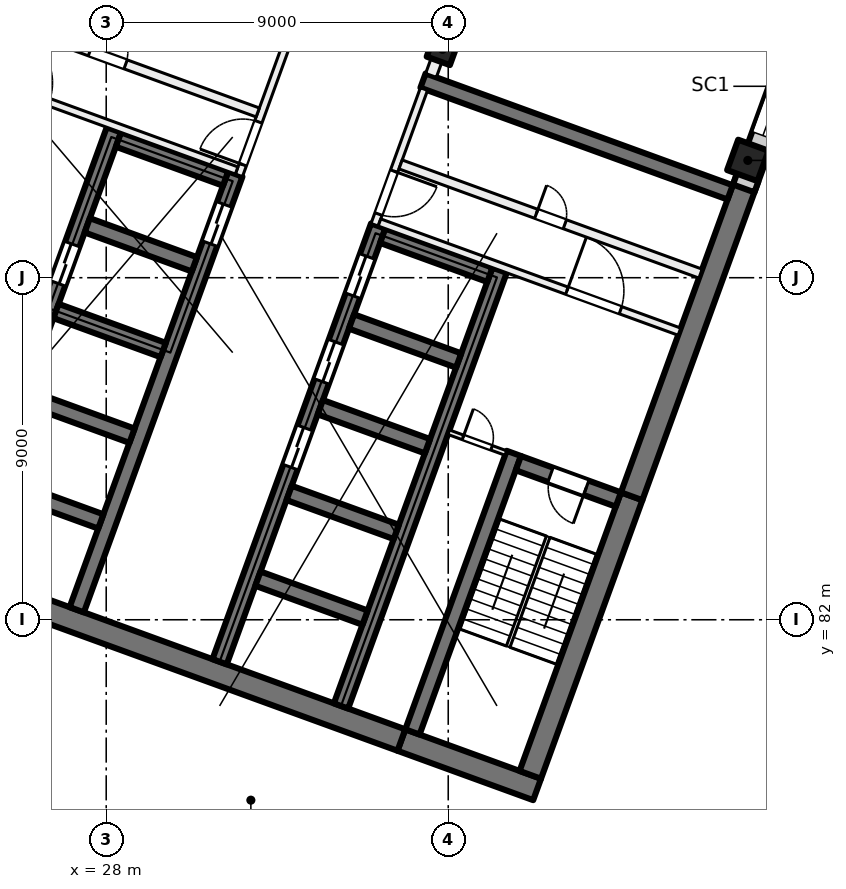
"""IFC4 building model, lengths in metres.
Left out: names, types, materials, properties, quantities, classifications, styles, units other than length and angle.
Written with IfcOpenShell. Run it as: python <this file> out.ifc"""

import sys

from ifc_helpers import new_model, si_unit, direction, frame, frame_2d, origin, origin_2d, place, context, subcontext, project, spatial, rectangle, extrude, element, fill, save


model = new_model("IFC4")
c1 = context("Model", 3, precision=1e-05, world=origin(), true_north=direction((0.0, 1.0)))
c2 = subcontext(c1, "Body", "Model", "MODEL_VIEW")
j1 = project(units=[si_unit("LENGTHUNIT", "METRE"), si_unit("PLANEANGLEUNIT", "RADIAN")], contexts=[c1])
p1 = place(None, origin())
s1 = spatial("IfcSite", under=j1, at=p1, CompositionType="ELEMENT")
p2 = place(p1, origin())
s2 = spatial("IfcBuilding", under=s1, at=p2, CompositionType="ELEMENT")
p3 = place(p2, frame((0.0, 0.0, 125.0)))
s3 = spatial("IfcBuildingStorey", under=s2, at=p3, CompositionType="ELEMENT", Elevation=125.0)
p4 = place(p3, frame((36.849, 97.011, 0.0), z_axis=(0.0, 0.0, 1.0), x_axis=(-0.342020143326, -0.939692620786, 0.0)))
e1 = element("IfcColumn", 1, at=p4, inside=s3, PredefinedType="COLUMN", context=c2, shape_type="SweptSolid", body=[
    extrude(rectangle(XDim=0.65, YDim=0.65, at=origin_2d()), origin(), (0.0, 0.0, 1.0), 4.0),
])
p5 = place(p3, frame((44.884, 94.087, 0.0), z_axis=(0.0, 0.0, 1.0), x_axis=(-0.342020143326, -0.939692620786, 0.0)))
e2 = element("IfcColumn", 2, at=p5, inside=s3, PredefinedType="COLUMN", context=c2, shape_type="SweptSolid", body=[
    extrude(rectangle(XDim=0.85, YDim=0.85, at=origin_2d()), origin(), (0.0, 0.0, 1.0), 4.0),
])
p6 = place(p3, frame((39.338, 77.535, 0.0), z_axis=(0.0, 0.0, 1.0), x_axis=(-0.939701471648, 0.341995824804, 0.0)))
e3 = element("IfcWall", 3, at=p6, inside=s3, PredefinedType="SHEAR", context=c2, shape_type="SweptSolid", body=[
    extrude(rectangle(XDim=3.8, YDim=0.6, at=frame_2d((1.9, 0.0))), origin(), (0.0, 0.0, 1.0), 4.0),
])
p7 = place(p3, frame((35.767, 78.835, 0.0), z_axis=(0.0, 0.0, 1.0), x_axis=(-0.939692894512, 0.342019391267, 0.0)))
e4 = element("IfcWall", 4, at=p7, inside=s3, PredefinedType="SHEAR", context=c2, shape_type="SweptSolid", body=[
    extrude(rectangle(XDim=14.4, YDim=0.6, at=frame_2d((7.2, 0.0))), origin(), (0.0, 0.0, 1.0), 4.0),
])
p8 = place(p3, frame((39.159, 77.92, 0.0), z_axis=(0.0, 0.0, 1.0), x_axis=(0.342016982193, 0.939693771338, 0.0)))
e5 = element("IfcWall", 5, at=p8, inside=s3, PredefinedType="SHEAR", context=c2, shape_type="SweptSolid", body=[
    extrude(rectangle(XDim=7.8, YDim=0.6, at=frame_2d((3.9, 0.0))), origin(), (0.0, 0.0, 1.0), 4.0),
])
p9 = place(p3, frame((41.827, 85.249, 0.0), z_axis=(0.0, 0.0, 1.0), x_axis=(0.342017595281, 0.939693548195, 0.0)))
e6 = element("IfcWall", 6, at=p9, inside=s3, PredefinedType="SHEAR", context=c2, shape_type="SweptSolid", body=[
    extrude(rectangle(XDim=8.925, YDim=0.6, at=frame_2d((4.462, 0.0))), origin(), (0.0, 0.0, 1.0), 4.0),
])
p10 = place(p3, frame((36.058, 79.048, 0.0), z_axis=(0.0, 0.0, 1.0), x_axis=(0.342016982193, 0.939693771338, 0.0)))
e7 = element("IfcWall", 7, at=p10, inside=s3, PredefinedType="SHEAR", context=c2, shape_type="SweptSolid", body=[
    extrude(rectangle(XDim=7.8, YDim=0.4, at=frame_2d((3.9, 0.0))), origin(), (0.0, 0.0, 1.0), 4.0),
])
p11 = place(p3, frame((41.476, 85.164, 0.0), z_axis=(0.0, 0.0, 1.0), x_axis=(-0.939678810556, 0.342058084236, 0.0)))
e8 = element("IfcWall", 8, at=p11, inside=s3, PredefinedType="SHEAR", context=c2, shape_type="SweptSolid", body=[
    extrude(rectangle(XDim=2.8, YDim=0.4, at=frame_2d((1.4, 0.0))), origin(), (0.0, 0.0, 1.0), 4.0),
])
p12 = place(p11, frame((0.9, 0.0, 0.0)))
e9 = element("IfcOpeningElement", 9, at=p12, cuts=e8, PredefinedType="OPENING", context=c2, shape_type="SweptSolid", body=[
    extrude(rectangle(XDim=1.0, YDim=2.1, at=frame_2d((0.5, 1.05))), frame((0.0, 0.21, 0.0), z_axis=(0.0, -1.0, 0.0), x_axis=(1.0, 0.0, 0.0)), (0.0, 0.0, 1.0), 0.42),
])
p13 = place(p3, frame((30.984, 80.895, 0.0), z_axis=(0.0, 0.0, 1.0), x_axis=(0.342021021735, 0.939692301071, 0.0)))
e10 = element("IfcWall", 10, at=p13, inside=s3, PredefinedType="SHEAR", context=c2, shape_type="SweptSolid", body=[
    extrude(rectangle(XDim=12.2, YDim=0.4, at=frame_2d((6.1, 0.0))), origin(), (0.0, 0.0, 1.0), 4.0),
])
p14 = place(p13, frame((5.45, 0.0, 0.0)))
e11 = element("IfcOpeningElement", 11, at=p14, cuts=e10, PredefinedType="OPENING", context=c2, shape_type="SweptSolid", body=[
    extrude(rectangle(XDim=1.1, YDim=2.1, at=frame_2d((0.55, 1.05))), frame((0.0, 0.21, 0.0), z_axis=(0.0, -1.0, 0.0), x_axis=(1.0, 0.0, 0.0)), (0.0, 0.0, 1.0), 0.42),
])
p15 = place(p13, frame((7.85, 0.0, 0.0)))
e12 = element("IfcOpeningElement", 12, at=p15, cuts=e10, PredefinedType="OPENING", context=c2, shape_type="SweptSolid", body=[
    extrude(rectangle(XDim=1.1, YDim=2.1, at=frame_2d((0.55, 1.05))), frame((0.0, 0.21, 0.0), z_axis=(0.0, -1.0, 0.0), x_axis=(1.0, 0.0, 0.0)), (0.0, 0.0, 1.0), 0.42),
])
p16 = place(p13, frame((10.25, 0.0, 0.0)))
e13 = element("IfcOpeningElement", 13, at=p16, cuts=e10, PredefinedType="OPENING", context=c2, shape_type="SweptSolid", body=[
    extrude(rectangle(XDim=1.1, YDim=2.1, at=frame_2d((0.55, 1.05))), frame((0.0, 0.21, 0.0), z_axis=(0.0, -1.0, 0.0), x_axis=(1.0, 0.0, 0.0)), (0.0, 0.0, 1.0), 0.42),
])
p17 = place(p3, frame((34.178, 79.732, 0.0), z_axis=(0.0, 0.0, 1.0), x_axis=(0.342014590177, 0.939694641948, 0.0)))
e14 = element("IfcWall", 14, at=p17, inside=s3, PredefinedType="SHEAR", context=c2, shape_type="SweptSolid", body=[
    extrude(rectangle(XDim=12.2, YDim=0.4, at=frame_2d((6.1, 0.0))), origin(), (0.0, 0.0, 1.0), 4.0),
])
for number, where, z_axis, x_axis in (
    (15, (34.812, 82.056, 0.0), (0.0, 0.0, 1.0), (-0.94, 0.342, 0.0)),
    (16, (35.632, 84.311, 0.0), (0.0, 0.0, 1.0), (-0.94, 0.342, 0.0)),
    (17, (36.453, 86.566, 0.0), (0.0, 0.0, 1.0), (-0.94, 0.342, 0.0)),
    (18, (37.274, 88.822, 0.0), (0.0, 0.0, 1.0), (-0.94, 0.342, 0.0)),
):
    element("IfcWall", number, at=place(p3, frame(where, z_axis=z_axis, x_axis=x_axis)), inside=s3, PredefinedType="SHEAR", context=c2, shape_type="SweptSolid", body=[
        extrude(rectangle(XDim=3.0, YDim=0.4, at=frame_2d((1.5, 0.0))), origin(), (0.0, 0.0, 1.0), 4.0),
    ])
p18 = place(p3, frame((38.095, 91.077, 0.0), z_axis=(0.0, 0.0, 1.0), x_axis=(-0.939676934218, 0.342063238742, 0.0)))
e19 = element("IfcWall", 19, at=p18, inside=s3, PredefinedType="SHEAR", context=c2, shape_type="SweptSolid", body=[
    extrude(rectangle(XDim=3.0, YDim=0.4, at=frame_2d((1.5, 0.0))), origin(), (0.0, 0.0, 1.0), 4.0),
])
p19 = place(p3, frame((27.225, 82.263, 0.0), z_axis=(0.0, 0.0, 1.0), x_axis=(0.342014590177, 0.939694641948, 0.0)))
e20 = element("IfcWall", 20, at=p19, inside=s3, PredefinedType="SHEAR", context=c2, shape_type="SweptSolid", body=[
    extrude(rectangle(XDim=12.2, YDim=0.4, at=frame_2d((6.1, 0.0))), origin(), (0.0, 0.0, 1.0), 4.0),
])
p20 = place(p19, frame((10.25, 0.0, 0.0)))
e21 = element("IfcOpeningElement", 21, at=p20, cuts=e20, PredefinedType="OPENING", context=c2, shape_type="SweptSolid", body=[
    extrude(rectangle(XDim=1.1, YDim=2.1, at=frame_2d((0.55, 1.05))), frame((0.0, 0.21, 0.0), z_axis=(0.0, -1.0, 0.0), x_axis=(1.0, 0.0, 0.0)), (0.0, 0.0, 1.0), 0.42),
])
p21 = place(p3, frame((24.03, 83.426, 0.0), z_axis=(0.0, 0.0, 1.0), x_axis=(0.342014590177, 0.939694641948, 0.0)))
e22 = element("IfcWall", 22, at=p21, inside=s3, PredefinedType="SHEAR", context=c2, shape_type="SweptSolid", body=[
    extrude(rectangle(XDim=12.2, YDim=0.4, at=frame_2d((6.1, 0.0))), origin(), (0.0, 0.0, 1.0), 4.0),
])
p22 = place(p21, frame((7.9, 0.0, 0.0)))
e23 = element("IfcOpeningElement", 23, at=p22, cuts=e22, PredefinedType="OPENING", context=c2, shape_type="SweptSolid", body=[
    extrude(rectangle(XDim=1.1, YDim=2.1, at=frame_2d((0.55, 1.05))), frame((0.0, 0.21, 0.0), z_axis=(0.0, -1.0, 0.0), x_axis=(1.0, 0.0, 0.0)), (0.0, 0.0, 1.0), 0.42),
])
p23 = place(p3, frame((27.858, 84.587, 0.0), z_axis=(0.0, 0.0, 1.0), x_axis=(-0.939686455819, 0.342037080957, 0.0)))
e24 = element("IfcWall", 24, at=p23, inside=s3, PredefinedType="SHEAR", context=c2, shape_type="SweptSolid", body=[
    extrude(rectangle(XDim=3.0, YDim=0.4, at=frame_2d((1.5, 0.0))), origin(), (0.0, 0.0, 1.0), 4.0),
])
p24 = place(p3, frame((28.678, 86.842, 0.0), z_axis=(0.0, 0.0, 1.0), x_axis=(-0.939676934218, 0.342063238742, 0.0)))
e25 = element("IfcWall", 25, at=p24, inside=s3, PredefinedType="SHEAR", context=c2, shape_type="SweptSolid", body=[
    extrude(rectangle(XDim=3.0, YDim=0.4, at=frame_2d((1.5, 0.0))), origin(), (0.0, 0.0, 1.0), 4.0),
])
for number, where, z_axis, x_axis in (
    (26, (29.5, 89.097, 0.0), (0.0, 0.0, 1.0), (-0.94, 0.342, 0.0)),
    (27, (30.32, 91.353, 0.0), (0.0, 0.0, 1.0), (-0.94, 0.342, 0.0)),
    (28, (31.141, 93.608, 0.0), (0.0, 0.0, 1.0), (-0.94, 0.342, 0.0)),
):
    element("IfcWall", number, at=place(p3, frame(where, z_axis=z_axis, x_axis=x_axis)), inside=s3, PredefinedType="SHEAR", context=c2, shape_type="SweptSolid", body=[
        extrude(rectangle(XDim=3.0, YDim=0.4, at=frame_2d((1.5, 0.0))), origin(), (0.0, 0.0, 1.0), 4.0),
    ])
p25 = place(p3, frame((44.418, 93.245, 0.0), z_axis=(0.0, 0.0, 1.0), x_axis=(-0.93969060187, 0.342025690201, 0.0)))
e29 = element("IfcWall", 29, at=p25, inside=s3, PredefinedType="SHEAR", context=c2, shape_type="SweptSolid", body=[
    extrude(rectangle(XDim=8.6, YDim=0.4, at=frame_2d((4.3, 0.0))), origin(), (0.0, 0.0, 1.0), 4.0),
])
p26 = place(p3, frame((52.212, 113.783, 0.0), z_axis=(0.0, 0.0, 1.0), x_axis=(-0.34202521188, -0.939690775968, 0.0)))
e30 = element("IfcWall", 30, at=p26, inside=s3, PredefinedType="SOLIDWALL", context=c2, shape_type="SweptSolid", body=[
    extrude(rectangle(XDim=21.745, YDim=0.6, at=frame_2d((10.873, 0.0))), origin(), (0.0, 0.0, 1.0), 3.625),
])
p27 = place(p26, frame((3.765, 0.0, 0.9)))
e31 = element("IfcOpeningElement", 31, at=p27, cuts=e30, PredefinedType="OPENING", context=c2, shape_type="SweptSolid", body=[
    extrude(rectangle(XDim=3.0, YDim=2.4, at=frame_2d((1.5, 1.2))), frame((0.0, 0.31, 0.0), z_axis=(0.0, -1.0, 0.0), x_axis=(1.0, 0.0, 0.0)), (0.0, 0.0, 1.0), 0.62),
])
p28 = place(p26, frame((8.265, 0.0, 0.9)))
e32 = element("IfcOpeningElement", 32, at=p28, cuts=e30, PredefinedType="OPENING", context=c2, shape_type="SweptSolid", body=[
    extrude(rectangle(XDim=3.0, YDim=2.4, at=frame_2d((1.5, 1.2))), frame((0.0, 0.31, 0.0), z_axis=(0.0, -1.0, 0.0), x_axis=(1.0, 0.0, 0.0)), (0.0, 0.0, 1.0), 0.62),
])
p29 = place(p26, frame((12.765, 0.0, 0.9)))
e33 = element("IfcOpeningElement", 33, at=p29, cuts=e30, PredefinedType="OPENING", context=c2, shape_type="SweptSolid", body=[
    extrude(rectangle(XDim=3.0, YDim=2.4, at=frame_2d((1.5, 1.2))), frame((0.0, 0.31, 0.0), z_axis=(0.0, -1.0, 0.0), x_axis=(1.0, 0.0, 0.0)), (0.0, 0.0, 1.0), 0.62),
])
p30 = place(p26, frame((17.265, 0.0, 0.9)))
e34 = element("IfcOpeningElement", 34, at=p30, cuts=e30, PredefinedType="OPENING", context=c2, shape_type="SweptSolid", body=[
    extrude(rectangle(XDim=3.0, YDim=2.4, at=frame_2d((1.5, 1.2))), frame((0.0, 0.31, 0.0), z_axis=(0.0, -1.0, 0.0), x_axis=(1.0, 0.0, 0.0)), (0.0, 0.0, 1.0), 0.62),
])
p31 = place(p3, frame((31.491, 93.693, 0.0), z_axis=(0.0, 0.0, 1.0), x_axis=(0.341995824804, 0.939701471648, 0.0)))
e35 = element("IfcWall", 35, at=p31, inside=s3, PredefinedType="PARTITIONING", context=c2, shape_type="SweptSolid", body=[
    extrude(rectangle(XDim=3.8, YDim=0.2, at=frame_2d((1.9, 0.0))), origin(), (0.0, 0.0, 1.0), 3.625),
])
p32 = place(p31, frame((0.3, 0.0, 0.0)))
e36 = element("IfcOpeningElement", 36, at=p32, cuts=e35, PredefinedType="OPENING", context=c2, shape_type="SweptSolid", body=[
    extrude(rectangle(XDim=1.2, YDim=2.1, at=frame_2d((0.6, 1.05))), frame((0.0, 0.11, 0.0), z_axis=(0.0, -1.0, 0.0), x_axis=(1.0, 0.0, 0.0)), (0.0, 0.0, 1.0), 0.22),
])
p33 = place(p3, frame((23.538, 96.694, 0.0), z_axis=(0.0, 0.0, 1.0), x_axis=(0.939691552312, -0.342023078919, 0.0)))
e37 = element("IfcWall", 37, at=p33, inside=s3, PredefinedType="PARTITIONING", context=c2, shape_type="SweptSolid", body=[
    extrude(rectangle(XDim=8.4, YDim=0.2, at=frame_2d((4.2, 0.0))), origin(), (0.0, 0.0, 1.0), 3.625),
])
p34 = place(p33, frame((1.65, 0.0, 0.0)))
e38 = element("IfcOpeningElement", 38, at=p34, cuts=e37, PredefinedType="OPENING", context=c2, shape_type="SweptSolid", body=[
    extrude(rectangle(XDim=1.5, YDim=2.1, at=frame_2d((0.75, 1.05))), frame((0.0, 0.11, 0.0), z_axis=(0.0, -1.0, 0.0), x_axis=(1.0, 0.0, 0.0)), (0.0, 0.0, 1.0), 0.22),
])
p35 = place(p3, frame((24.094, 98.221, 0.0), z_axis=(0.0, 0.0, 1.0), x_axis=(0.939691552312, -0.342023078919, 0.0)))
e39 = element("IfcWall", 39, at=p35, inside=s3, PredefinedType="PARTITIONING", context=c2, shape_type="SweptSolid", body=[
    extrude(rectangle(XDim=8.4, YDim=0.25, at=frame_2d((4.2, 0.0))), origin(), (0.0, 0.0, 1.0), 3.625),
])
p36 = place(p35, frame((3.7, 0.0, 0.0)))
e40 = element("IfcOpeningElement", 40, at=p36, cuts=e39, PredefinedType="OPENING", context=c2, shape_type="SweptSolid", body=[
    extrude(rectangle(XDim=1.0, YDim=2.1, at=frame_2d((0.5, 1.05))), frame((0.0, 0.135, 0.0), z_axis=(0.0, -1.0, 0.0), x_axis=(1.0, 0.0, 0.0)), (0.0, 0.0, 1.0), 0.27),
])
p37 = place(p3, frame((36.362, 95.964, 0.0), z_axis=(0.0, 0.0, 1.0), x_axis=(-0.341995824804, -0.939701471648, 0.0)))
e41 = element("IfcWall", 41, at=p37, inside=s3, PredefinedType="PARTITIONING", context=c2, shape_type="SweptSolid", body=[
    extrude(rectangle(XDim=3.8, YDim=0.2, at=frame_2d((1.9, 0.0))), origin(), (0.0, 0.0, 1.0), 3.625),
])
p38 = place(p37, frame((2.3, 0.0, 0.0)))
e42 = element("IfcOpeningElement", 42, at=p38, cuts=e41, PredefinedType="OPENING", context=c2, shape_type="SweptSolid", body=[
    extrude(rectangle(XDim=1.2, YDim=2.1, at=frame_2d((0.6, 1.05))), frame((0.0, 0.11, 0.0), z_axis=(0.0, -1.0, 0.0), x_axis=(1.0, 0.0, 0.0)), (0.0, 0.0, 1.0), 0.22),
])
p39 = place(p3, frame((35.19, 92.453, 0.0), z_axis=(0.0, 0.0, 1.0), x_axis=(0.939691552312, -0.342023078919, 0.0)))
e43 = element("IfcWall", 43, at=p39, inside=s3, PredefinedType="PARTITIONING", context=c2, shape_type="SweptSolid", body=[
    extrude(rectangle(XDim=8.4, YDim=0.2, at=frame_2d((4.2, 0.0))), origin(), (0.0, 0.0, 1.0), 3.625),
])
p40 = place(p39, frame((5.25, 0.0, 0.0)))
e44 = element("IfcOpeningElement", 44, at=p40, cuts=e43, PredefinedType="OPENING", context=c2, shape_type="SweptSolid", body=[
    extrude(rectangle(XDim=1.5, YDim=2.1, at=frame_2d((0.75, 1.05))), frame((0.0, 0.11, 0.0), z_axis=(0.0, -1.0, 0.0), x_axis=(1.0, 0.0, 0.0)), (0.0, 0.0, 1.0), 0.22),
])
p41 = place(p3, frame((35.746, 93.98, 0.0), z_axis=(0.0, 0.0, 1.0), x_axis=(0.939691552312, -0.342023078919, 0.0)))
e45 = element("IfcWall", 45, at=p41, inside=s3, PredefinedType="PARTITIONING", context=c2, shape_type="SweptSolid", body=[
    extrude(rectangle(XDim=8.4, YDim=0.25, at=frame_2d((4.2, 0.0))), origin(), (0.0, 0.0, 1.0), 3.625),
])
p42 = place(p41, frame((3.8, 0.0, 0.0)))
e46 = element("IfcOpeningElement", 46, at=p42, cuts=e45, PredefinedType="OPENING", context=c2, shape_type="SweptSolid", body=[
    extrude(rectangle(XDim=0.8, YDim=2.1, at=frame_2d((0.4, 1.05))), frame((0.0, 0.135, 0.0), z_axis=(0.0, -1.0, 0.0), x_axis=(1.0, 0.0, 0.0)), (0.0, 0.0, 1.0), 0.27),
])
p43 = place(p3, frame((37.013, 86.935, 0.0), z_axis=(0.0, 0.0, 1.0), x_axis=(0.939659694648, -0.342110593602, 0.0)))
e47 = element("IfcWall", 47, at=p43, inside=s3, PredefinedType="PARTITIONING", context=c2, shape_type="SweptSolid", body=[
    extrude(rectangle(XDim=1.6, YDim=0.125, at=frame_2d((0.8, 0.0))), origin(), (0.0, 0.0, 1.0), 3.625),
])
p44 = place(p43, frame((0.4, 0.0, 0.0)))
e48 = element("IfcOpeningElement", 48, at=p44, cuts=e47, PredefinedType="OPENING", context=c2, shape_type="SweptSolid", body=[
    extrude(rectangle(XDim=0.8, YDim=2.1, at=frame_2d((0.4, 1.05))), frame((0.0, 0.073, 0.0), z_axis=(0.0, -1.0, 0.0), x_axis=(1.0, 0.0, 0.0)), (0.0, 0.0, 1.0), 0.145),
])
p45 = place(p3, frame((47.314, 125.909, 0.0), z_axis=(0.0, 0.0, 1.0), x_axis=(-0.342010770371, -0.939696032209, 0.0)))
e49 = element("IfcWall", 49, at=p45, inside=s3, PredefinedType="PARTITIONING", context=c2, shape_type="SweptSolid", body=[
    extrude(rectangle(XDim=31.485, YDim=0.3, at=frame_2d((15.742, 0.0))), origin(), (0.0, 0.0, 1.0), 3.625),
])
p46 = place(p45, frame((22.21, 0.0, 0.0)))
e50 = element("IfcOpeningElement", 50, at=p46, cuts=e49, PredefinedType="OPENING", context=c2, shape_type="SweptSolid", body=[
    extrude(rectangle(XDim=1.8, YDim=2.1, at=frame_2d((0.9, 1.05))), frame((0.0, 0.16, 0.0), z_axis=(0.0, -1.0, 0.0), x_axis=(1.0, 0.0, 0.0)), (0.0, 0.0, 1.0), 0.32),
])
p47 = place(p45, frame((9.885, 0.0, 0.0)))
e51 = element("IfcOpeningElement", 51, at=p47, cuts=e49, PredefinedType="OPENING", context=c2, shape_type="SweptSolid", body=[
    extrude(rectangle(XDim=1.2, YDim=2.1, at=frame_2d((0.6, 1.05))), frame((0.0, 0.16, 0.0), z_axis=(0.0, -1.0, 0.0), x_axis=(1.0, 0.0, 0.0)), (0.0, 0.0, 1.0), 0.32),
])
p48 = place(p45, frame((5.484, 0.0, 0.0)))
e52 = element("IfcOpeningElement", 52, at=p48, cuts=e49, PredefinedType="OPENING", context=c2, shape_type="SweptSolid", body=[
    extrude(rectangle(XDim=1.0, YDim=2.1, at=frame_2d((0.5, 1.05))), frame((0.0, 0.16, 0.0), z_axis=(0.0, -1.0, 0.0), x_axis=(1.0, 0.0, 0.0)), (0.0, 0.0, 1.0), 0.32),
])
p49 = place(p30, origin())
e53 = element("IfcWindow", 53, at=p49, inside=s3, PartitioningType="SINGLE_PANEL", PredefinedType="WINDOW", context=c2, shape_type="SweptSolid", body=[
    extrude(rectangle(XDim=3.0, YDim=2.4, at=frame_2d((1.5, 1.2))), frame((0.0, 0.03, 0.0), z_axis=(0.0, -1.0, 0.0), x_axis=(1.0, 0.0, 0.0)), (0.0, 0.0, 1.0), 0.06),
])
fill(e34, e53)
p50 = place(p20, origin())
e54 = element("IfcDoor", 54, at=p50, inside=s3, OperationType="DOUBLE_DOOR_SLIDING", PredefinedType="DOOR", context=c2, shape_type="SweptSolid", body=[
    extrude(rectangle(XDim=1.1, YDim=2.1, at=frame_2d((0.55, 1.05))), frame((0.0, 0.025, 0.0), z_axis=(0.0, -1.0, 0.0), x_axis=(1.0, 0.0, 0.0)), (0.0, 0.0, 1.0), 0.05),
])
fill(e21, e54)
p51 = place(p14, origin())
e55 = element("IfcDoor", 55, at=p51, inside=s3, OperationType="DOUBLE_DOOR_SLIDING", PredefinedType="DOOR", context=c2, shape_type="SweptSolid", body=[
    extrude(rectangle(XDim=1.1, YDim=2.1, at=frame_2d((0.55, 1.05))), frame((0.0, 0.025, 0.0), z_axis=(0.0, -1.0, 0.0), x_axis=(1.0, 0.0, 0.0)), (0.0, 0.0, 1.0), 0.05),
])
fill(e11, e55)
p52 = place(p15, origin())
e56 = element("IfcDoor", 56, at=p52, inside=s3, OperationType="DOUBLE_DOOR_SLIDING", PredefinedType="DOOR", context=c2, shape_type="SweptSolid", body=[
    extrude(rectangle(XDim=1.1, YDim=2.1, at=frame_2d((0.55, 1.05))), frame((0.0, 0.025, 0.0), z_axis=(0.0, -1.0, 0.0), x_axis=(1.0, 0.0, 0.0)), (0.0, 0.0, 1.0), 0.05),
])
fill(e12, e56)
p53 = place(p16, origin())
e57 = element("IfcDoor", 57, at=p53, inside=s3, OperationType="DOUBLE_DOOR_SLIDING", PredefinedType="DOOR", context=c2, shape_type="SweptSolid", body=[
    extrude(rectangle(XDim=1.1, YDim=2.1, at=frame_2d((0.55, 1.05))), frame((0.0, 0.025, 0.0), z_axis=(0.0, -1.0, 0.0), x_axis=(1.0, 0.0, 0.0)), (0.0, 0.0, 1.0), 0.05),
])
fill(e13, e57)
p54 = place(p32, origin())
e58 = element("IfcDoor", 58, at=p54, inside=s3, OperationType="DOUBLE_DOOR_SINGLE_SWING", PredefinedType="DOOR", context=c2, shape_type="SweptSolid", body=[
    extrude(rectangle(XDim=1.2, YDim=2.1, at=frame_2d((0.6, 1.05))), frame((0.0, 0.025, 0.0), z_axis=(0.0, -1.0, 0.0), x_axis=(1.0, 0.0, 0.0)), (0.0, 0.0, 1.0), 0.05),
])
fill(e36, e58)
p55 = place(p36, origin())
e59 = element("IfcDoor", 59, at=p55, inside=s3, OperationType="SINGLE_SWING_LEFT", PredefinedType="DOOR", context=c2, shape_type="SweptSolid", body=[
    extrude(rectangle(XDim=1.0, YDim=2.1, at=frame_2d((0.5, 1.05))), frame((0.0, 0.025, 0.0), z_axis=(0.0, -1.0, 0.0), x_axis=(1.0, 0.0, 0.0)), (0.0, 0.0, 1.0), 0.05),
])
fill(e40, e59)
p56 = place(p38, origin())
e60 = element("IfcDoor", 60, at=p56, inside=s3, OperationType="DOUBLE_DOOR_SINGLE_SWING", PredefinedType="DOOR", context=c2, shape_type="SweptSolid", body=[
    extrude(rectangle(XDim=1.2, YDim=2.1, at=frame_2d((0.6, 1.05))), frame((0.0, 0.025, 0.0), z_axis=(0.0, -1.0, 0.0), x_axis=(1.0, 0.0, 0.0)), (0.0, 0.0, 1.0), 0.05),
])
fill(e42, e60)
p57 = place(p40, origin())
e61 = element("IfcDoor", 61, at=p57, inside=s3, OperationType="DOUBLE_DOOR_SINGLE_SWING", PredefinedType="DOOR", context=c2, shape_type="SweptSolid", body=[
    extrude(rectangle(XDim=1.5, YDim=2.1, at=frame_2d((0.75, 1.05))), frame((0.0, 0.025, 0.0), z_axis=(0.0, -1.0, 0.0), x_axis=(1.0, 0.0, 0.0)), (0.0, 0.0, 1.0), 0.05),
])
fill(e44, e61)
p58 = place(p12, origin())
e62 = element("IfcDoor", 62, at=p58, inside=s3, OperationType="SINGLE_SWING_RIGHT", PredefinedType="DOOR", context=c2, shape_type="SweptSolid", body=[
    extrude(rectangle(XDim=1.0, YDim=2.1, at=frame_2d((0.5, 1.05))), frame((0.0, 0.025, 0.0), z_axis=(0.0, -1.0, 0.0), x_axis=(1.0, 0.0, 0.0)), (0.0, 0.0, 1.0), 0.05),
])
fill(e9, e62)
p59 = place(p44, origin())
e63 = element("IfcDoor", 63, at=p59, inside=s3, OperationType="SINGLE_SWING_LEFT", PredefinedType="DOOR", context=c2, shape_type="SweptSolid", body=[
    extrude(rectangle(XDim=0.8, YDim=2.1, at=frame_2d((0.4, 1.05))), frame((0.0, 0.025, 0.0), z_axis=(0.0, -1.0, 0.0), x_axis=(1.0, 0.0, 0.0)), (0.0, 0.0, 1.0), 0.05),
])
fill(e48, e63)
p60 = place(p42, origin())
e64 = element("IfcDoor", 64, at=p60, inside=s3, OperationType="SINGLE_SWING_RIGHT", PredefinedType="DOOR", context=c2, shape_type="SweptSolid", body=[
    extrude(rectangle(XDim=0.8, YDim=2.1, at=frame_2d((0.4, 1.05))), frame((0.0, 0.025, 0.0), z_axis=(0.0, -1.0, 0.0), x_axis=(1.0, 0.0, 0.0)), (0.0, 0.0, 1.0), 0.05),
])
fill(e46, e64)
p61 = place(p22, origin())
e65 = element("IfcDoor", 65, at=p61, inside=s3, OperationType="DOUBLE_DOOR_SLIDING", PredefinedType="DOOR", context=c2, shape_type="SweptSolid", body=[
    extrude(rectangle(XDim=1.1, YDim=2.1, at=frame_2d((0.55, 1.05))), frame((0.0, 0.025, 0.0), z_axis=(0.0, -1.0, 0.0), x_axis=(1.0, 0.0, 0.0)), (0.0, 0.0, 1.0), 0.05),
])
fill(e23, e65)
save(model, sys.argv[1])
